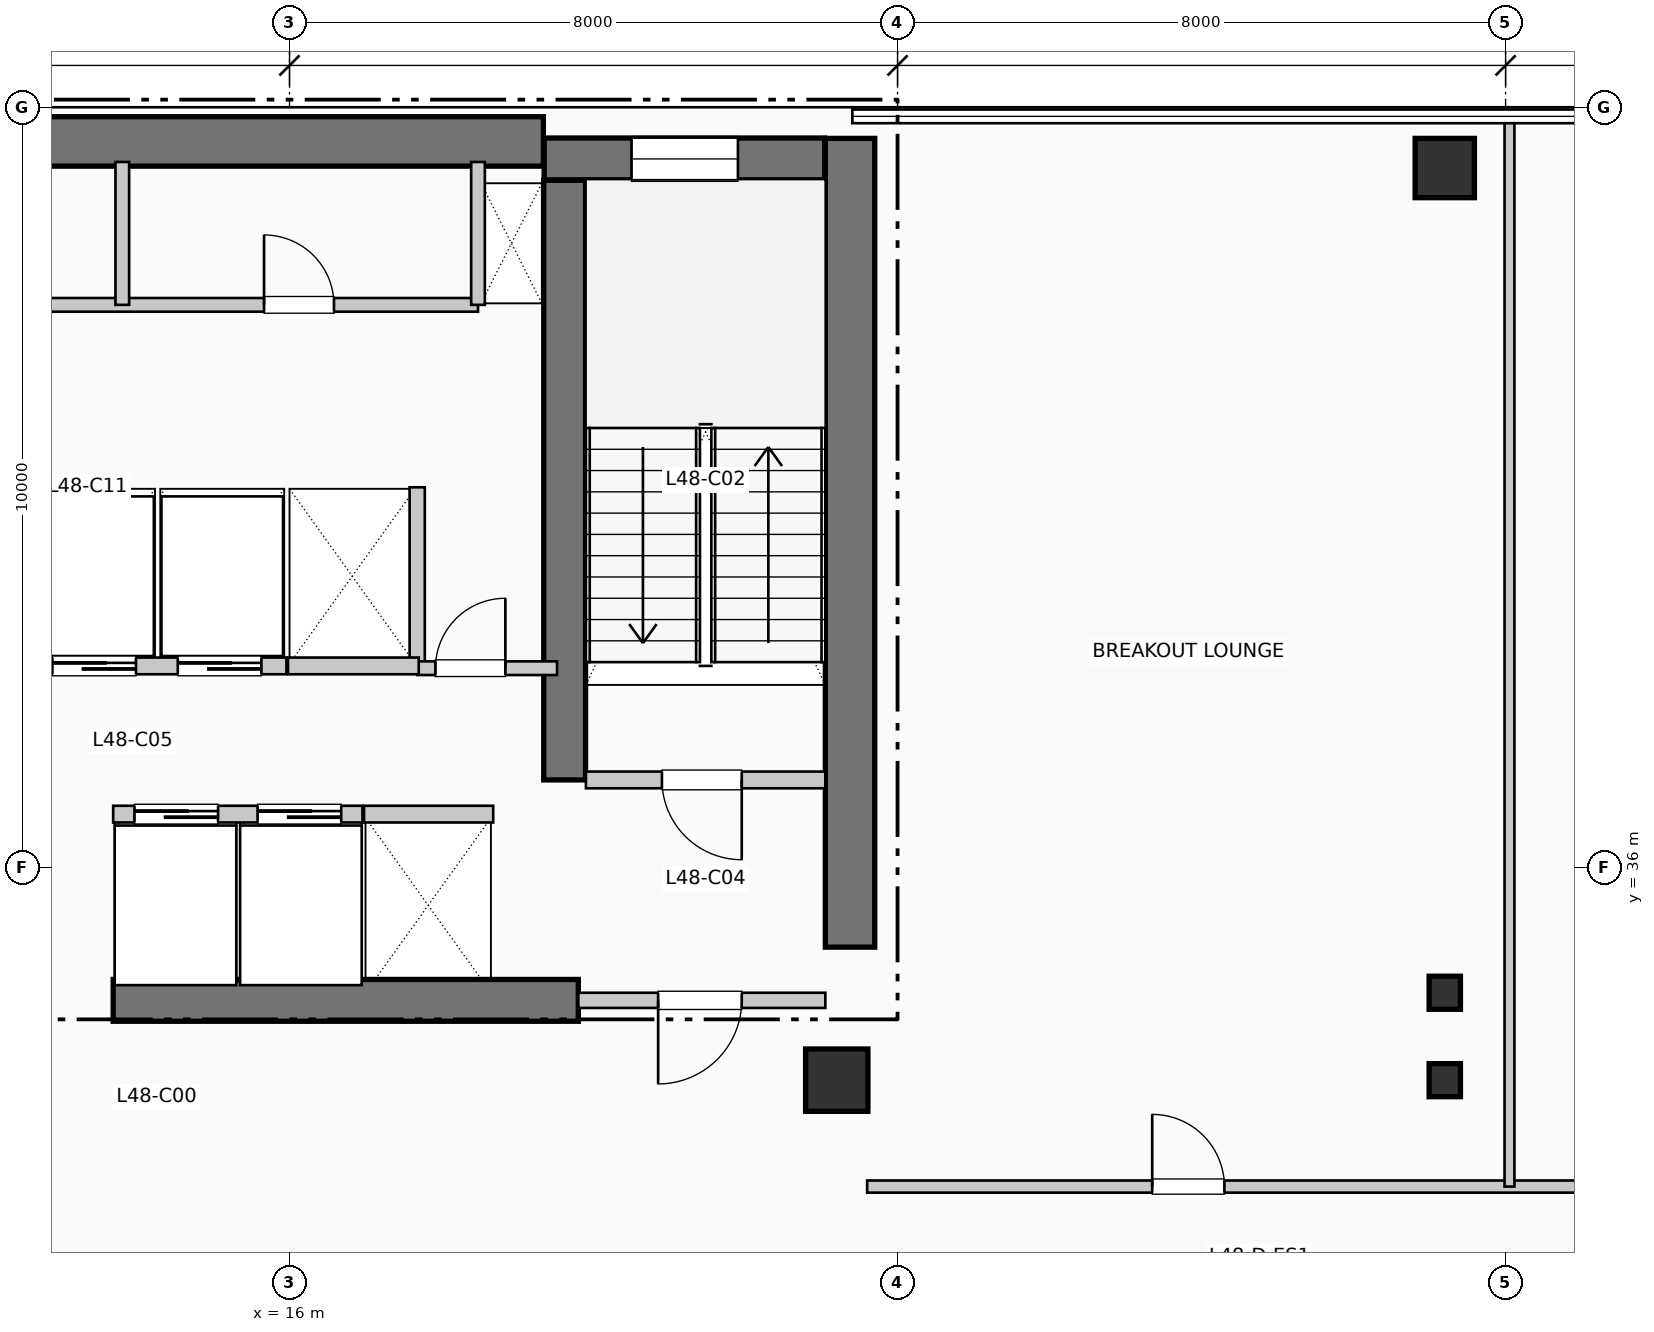
"""IFC4 building model, lengths in metres.
Left out: names, types, materials, properties, quantities, classifications, styles, units other than length and angle.
Written with IfcOpenShell. Run it as: python <this file> out.ifc"""

import sys

from ifc_helpers import new_model, si_unit, direction, frame, frame_2d, origin, origin_2d, place, context, subcontext, project, spatial, rectangle, i_section, extrude, element, fill, save


model = new_model("IFC4")
c1 = context("Model", 3, precision=1e-05, world=origin(), true_north=direction((0.0, 1.0)))
c2 = subcontext(c1, "Body", "Model", "MODEL_VIEW")
j1 = project(units=[si_unit("LENGTHUNIT", "METRE"), si_unit("PLANEANGLEUNIT", "RADIAN")], contexts=[c1])
p1 = place(None, origin())
s1 = spatial("IfcSite", under=j1, at=p1, CompositionType="ELEMENT")
p2 = place(p1, origin())
s2 = spatial("IfcBuilding", under=s1, at=p2, CompositionType="ELEMENT")
p3 = place(p2, frame((0.0, 0.0, 199.32)))
s3 = spatial("IfcBuildingStorey", under=s2, at=p3, CompositionType="ELEMENT", Elevation=199.32)
p4 = place(p3, frame((5.36, 45.55, 0.0), z_axis=(0.0, 0.0, 1.0), x_axis=(1.0, 0.0, 0.0)))
e1 = element("IfcWall", 1, at=p4, inside=s3, PredefinedType="SHEAR", context=c2, shape_type="SweptSolid", body=[
    extrude(rectangle(XDim=13.98, YDim=0.65, at=frame_2d((6.99, 0.0))), origin(), (0.0, 0.0, 1.0), 3.96),
])
p5 = place(p3, frame((23.375, 34.95, 0.0), z_axis=(0.0, 0.0, 1.0), x_axis=(0.0, 1.0, 0.0)))
e2 = element("IfcWall", 2, at=p5, inside=s3, PredefinedType="SHEAR", context=c2, shape_type="SweptSolid", body=[
    extrude(rectangle(XDim=10.64, YDim=0.65, at=frame_2d((5.32, 0.0))), origin(), (0.0, 0.0, 1.0), 3.96),
])
p6 = place(p3, frame((13.68, 34.25, 0.0), z_axis=(0.0, 0.0, 1.0), x_axis=(1.0, 0.0, 0.0)))
e3 = element("IfcWall", 3, at=p6, inside=s3, PredefinedType="SHEAR", context=c2, shape_type="SweptSolid", body=[
    extrude(rectangle(XDim=6.12, YDim=0.55, at=frame_2d((3.06, 0.0))), origin(), (0.0, 0.0, 1.0), 3.96),
])
p7 = place(p3, frame((19.62, 37.15, 0.0), z_axis=(0.0, 0.0, 1.0), x_axis=(0.0, 1.0, 0.0)))
e4 = element("IfcWall", 4, at=p7, inside=s3, PredefinedType="SHEAR", context=c2, shape_type="SweptSolid", body=[
    extrude(rectangle(XDim=7.89, YDim=0.55, at=frame_2d((3.945, 0.0))), origin(), (0.0, 0.0, 1.0), 3.96),
])
p8 = place(p3, frame((19.35, 45.32, 0.0), z_axis=(0.0, 0.0, 1.0), x_axis=(1.0, 0.0, 0.0)))
e5 = element("IfcWall", 5, at=p8, inside=s3, PredefinedType="SHEAR", context=c2, shape_type="SweptSolid", body=[
    extrude(rectangle(XDim=3.69, YDim=0.55, at=frame_2d((1.845, 0.0))), origin(), (0.0, 0.0, 1.0), 3.96),
])
p9 = place(p8, frame((1.15, 0.0, 1.05)))
e6 = element("IfcOpeningElement", 6, at=p9, cuts=e5, PredefinedType="OPENING", context=c2, shape_type="SweptSolid", body=[
    extrude(rectangle(XDim=1.4, YDim=1.8, at=frame_2d((0.7, 0.9))), frame((0.0, 0.285, 0.0), z_axis=(0.0, -1.0, 0.0), x_axis=(1.0, 0.0, 0.0)), (0.0, 0.0, 1.0), 0.57),
])
p10 = place(p3, frame((23.2, 33.2, 0.0), z_axis=(0.0, 0.0, 1.0), x_axis=(1.0, 0.0, 0.0)))
e7 = element("IfcColumn", 7, at=p10, inside=s3, PredefinedType="COLUMN", context=c2, shape_type="SweptSolid", body=[
    extrude(rectangle(XDim=0.82, YDim=0.82, at=origin_2d()), origin(), (0.0, 0.0, 1.0), 3.96),
])
for number, where, z_axis, x_axis in (
    (8, (31.2, 33.2, 0.0), (0.0, 0.0, 1.0), (1.0, 0.0, 0.0)),
    (9, (31.2, 34.35, 0.0), (0.0, 0.0, 1.0), (1.0, 0.0, 0.0)),
):
    element("IfcColumn", number, at=place(p3, frame(where, z_axis=z_axis, x_axis=x_axis)), inside=s3, PredefinedType="COLUMN", context=c2, shape_type="SweptSolid", body=[
        extrude(i_section(OverallWidth=0.412, OverallDepth=0.435, WebThickness=0.027, FlangeThickness=0.043, at=origin_2d()), origin(), (0.0, 0.0, 1.0), 3.96),
    ])
p11 = place(p3, frame((31.2, 45.2, 0.0), z_axis=(0.0, 0.0, 1.0), x_axis=(1.0, 0.0, 0.0)))
e10 = element("IfcColumn", 10, at=p11, inside=s3, PredefinedType="COLUMN", context=c2, shape_type="SweptSolid", body=[
    extrude(rectangle(XDim=0.78, YDim=0.78, at=origin_2d()), origin(), (0.0, 0.0, 1.0), 3.96),
])
p12 = place(p3, frame((19.9, 37.15, 0.0), z_axis=(0.0, 0.0, 1.0), x_axis=(1.0, 0.0, 0.0)))
e11 = element("IfcWall", 11, at=p12, inside=s3, PredefinedType="PARTITIONING", context=c2, shape_type="SweptSolid", body=[
    extrude(rectangle(XDim=3.15, YDim=0.22, at=frame_2d((1.575, 0.0))), origin(), (0.0, 0.0, 1.0), 3.71),
])
p13 = place(p12, frame((2.05, 0.0, 0.0), z_axis=(0.0, 0.0, 1.0), x_axis=(-1.0, 0.0, 0.0)))
e12 = element("IfcOpeningElement", 12, at=p13, cuts=e11, PredefinedType="OPENING", context=c2, shape_type="SweptSolid", body=[
    extrude(rectangle(XDim=1.05, YDim=2.15, at=frame_2d((0.525, 1.075))), frame((0.0, 0.12, 0.0), z_axis=(0.0, -1.0, 0.0), x_axis=(1.0, 0.0, 0.0)), (0.0, 0.0, 1.0), 0.24),
])
p14 = place(p3, frame((19.8, 34.25, 0.0), z_axis=(0.0, 0.0, 1.0), x_axis=(1.0, 0.0, 0.0)))
e13 = element("IfcWall", 13, at=p14, inside=s3, PredefinedType="PARTITIONING", context=c2, shape_type="SweptSolid", body=[
    extrude(rectangle(XDim=3.25, YDim=0.2, at=frame_2d((1.625, 0.0))), origin(), (0.0, 0.0, 1.0), 3.71),
])
p15 = place(p14, frame((2.15, 0.0, 0.0), z_axis=(0.0, 0.0, 1.0), x_axis=(-1.0, 0.0, 0.0)))
e14 = element("IfcOpeningElement", 14, at=p15, cuts=e13, PredefinedType="OPENING", context=c2, shape_type="SweptSolid", body=[
    extrude(rectangle(XDim=1.1, YDim=2.15, at=frame_2d((0.55, 1.075))), frame((0.0, 0.11, 0.0), z_axis=(0.0, -1.0, 0.0), x_axis=(1.0, 0.0, 0.0)), (0.0, 0.0, 1.0), 0.22),
])
p16 = place(p3, frame((17.68, 38.65, 0.0), z_axis=(0.0, 0.0, 1.0), x_axis=(0.0, 1.0, 0.0)))
e15 = element("IfcWall", 15, at=p16, inside=s3, PredefinedType="PARTITIONING", context=c2, shape_type="SweptSolid", body=[
    extrude(rectangle(XDim=2.35, YDim=0.2, at=frame_2d((1.175, 0.0))), origin(), (0.0, 0.0, 1.0), 3.71),
])
p17 = place(p3, frame((17.68, 38.62, 0.0), z_axis=(0.0, 0.0, 1.0), x_axis=(1.0, 0.0, 0.0)))
e16 = element("IfcWall", 16, at=p17, inside=s3, PredefinedType="PARTITIONING", context=c2, shape_type="SweptSolid", body=[
    extrude(rectangle(XDim=1.84, YDim=0.18, at=frame_2d((0.92, 0.0))), origin(), (0.0, 0.0, 1.0), 3.71),
])
p18 = place(p17, frame((0.24, 0.0, 0.0)))
e17 = element("IfcOpeningElement", 17, at=p18, cuts=e16, PredefinedType="OPENING", context=c2, shape_type="SweptSolid", body=[
    extrude(rectangle(XDim=0.92, YDim=2.1, at=frame_2d((0.46, 1.05))), frame((0.0, 0.1, 0.0), z_axis=(0.0, -1.0, 0.0), x_axis=(1.0, 0.0, 0.0)), (0.0, 0.0, 1.0), 0.2),
])
p19 = place(p3, frame((13.68, 36.7, 0.0), z_axis=(0.0, 0.0, 1.0), x_axis=(1.0, 0.0, 0.0)))
e18 = element("IfcWall", 18, at=p19, inside=s3, PredefinedType="PARTITIONING", context=c2, shape_type="SweptSolid", body=[
    extrude(rectangle(XDim=3.28, YDim=0.22, at=frame_2d((1.64, 0.0))), origin(), (0.0, 0.0, 1.0), 3.71),
])
p20 = place(p19, frame((0.28, 0.0, 0.0)))
e19 = element("IfcOpeningElement", 19, at=p20, cuts=e18, PredefinedType="OPENING", context=c2, shape_type="SweptSolid", body=[
    extrude(rectangle(XDim=1.1, YDim=2.2, at=frame_2d((0.55, 1.1))), frame((0.0, 0.12, 0.0), z_axis=(0.0, -1.0, 0.0), x_axis=(1.0, 0.0, 0.0)), (0.0, 0.0, 1.0), 0.24),
])
p21 = place(p19, frame((1.9, 0.0, 0.0)))
e20 = element("IfcOpeningElement", 20, at=p21, cuts=e18, PredefinedType="OPENING", context=c2, shape_type="SweptSolid", body=[
    extrude(rectangle(XDim=1.1, YDim=2.2, at=frame_2d((0.55, 1.1))), frame((0.0, 0.12, 0.0), z_axis=(0.0, -1.0, 0.0), x_axis=(1.0, 0.0, 0.0)), (0.0, 0.0, 1.0), 0.24),
])
p22 = place(p3, frame((12.58, 38.65, 0.0), z_axis=(0.0, 0.0, 1.0), x_axis=(1.0, 0.0, 0.0)))
e21 = element("IfcWall", 21, at=p22, inside=s3, PredefinedType="PARTITIONING", context=c2, shape_type="SweptSolid", body=[
    extrude(rectangle(XDim=3.38, YDim=0.22, at=frame_2d((1.69, 0.0))), origin(), (0.0, 0.0, 1.0), 3.71),
])
p23 = place(p22, frame((0.3, 0.0, 0.0)))
e22 = element("IfcOpeningElement", 22, at=p23, cuts=e21, PredefinedType="OPENING", context=c2, shape_type="SweptSolid", body=[
    extrude(rectangle(XDim=1.1, YDim=2.2, at=frame_2d((0.55, 1.1))), frame((0.0, 0.12, 0.0), z_axis=(0.0, -1.0, 0.0), x_axis=(1.0, 0.0, 0.0)), (0.0, 0.0, 1.0), 0.24),
])
p24 = place(p22, frame((1.95, 0.0, 0.0)))
e23 = element("IfcOpeningElement", 23, at=p24, cuts=e21, PredefinedType="OPENING", context=c2, shape_type="SweptSolid", body=[
    extrude(rectangle(XDim=1.1, YDim=2.2, at=frame_2d((0.55, 1.1))), frame((0.0, 0.12, 0.0), z_axis=(0.0, -1.0, 0.0), x_axis=(1.0, 0.0, 0.0)), (0.0, 0.0, 1.0), 0.24),
])
p25 = place(p3, frame((16.98, 36.7, 0.0), z_axis=(0.0, 0.0, 1.0), x_axis=(1.0, 0.0, 0.0)))
e24 = element("IfcWall", 24, at=p25, inside=s3, PredefinedType="PARTITIONING", context=c2, shape_type="SweptSolid", body=[
    extrude(rectangle(XDim=1.7, YDim=0.22, at=frame_2d((0.85, 0.0))), origin(), (0.0, 0.0, 1.0), 3.71),
])
p26 = place(p3, frame((15.98, 38.65, 0.0), z_axis=(0.0, 0.0, 1.0), x_axis=(1.0, 0.0, 0.0)))
e25 = element("IfcWall", 25, at=p26, inside=s3, PredefinedType="PARTITIONING", context=c2, shape_type="SweptSolid", body=[
    extrude(rectangle(XDim=1.72, YDim=0.22, at=frame_2d((0.86, 0.0))), origin(), (0.0, 0.0, 1.0), 3.71),
])
p27 = place(p3, frame((9.15, 43.4, 0.0), z_axis=(0.0, 0.0, 1.0), x_axis=(1.0, 0.0, 0.0)))
e26 = element("IfcWall", 26, at=p27, inside=s3, PredefinedType="PLUMBINGWALL", context=c2, shape_type="SweptSolid", body=[
    extrude(rectangle(XDim=9.33, YDim=0.18, at=frame_2d((4.665, 0.0))), origin(), (0.0, 0.0, 1.0), 3.71),
])
p28 = place(p27, frame((1.88, 0.0, 0.0)))
e27 = element("IfcOpeningElement", 27, at=p28, cuts=e26, PredefinedType="OPENING", context=c2, shape_type="SweptSolid", body=[
    extrude(rectangle(XDim=0.92, YDim=2.1, at=frame_2d((0.46, 1.05))), frame((0.0, 0.1, 0.0), z_axis=(0.0, -1.0, 0.0), x_axis=(1.0, 0.0, 0.0)), (0.0, 0.0, 1.0), 0.2),
])
p29 = place(p27, frame((6.515, 0.0, 0.0)))
e28 = element("IfcOpeningElement", 28, at=p29, cuts=e26, PredefinedType="OPENING", context=c2, shape_type="SweptSolid", body=[
    extrude(rectangle(XDim=0.92, YDim=2.1, at=frame_2d((0.46, 1.05))), frame((0.0, 0.1, 0.0), z_axis=(0.0, -1.0, 0.0), x_axis=(1.0, 0.0, 0.0)), (0.0, 0.0, 1.0), 0.2),
])
for number, where, z_axis, x_axis in (
    (29, (18.48, 43.4, 0.0), (0.0, 0.0, 1.0), (0.0, 1.0, 0.0)),
    (30, (13.8, 43.4, 0.0), (0.0, 0.0, 1.0), (0.0, 1.0, 0.0)),
):
    element("IfcWall", number, at=place(p3, frame(where, z_axis=z_axis, x_axis=x_axis)), inside=s3, PredefinedType="PLUMBINGWALL", context=c2, shape_type="SweptSolid", body=[
        extrude(rectangle(XDim=1.88, YDim=0.18, at=frame_2d((0.94, 0.0))), origin(), (0.0, 0.0, 1.0), 3.71),
    ])
p30 = place(p3, frame((23.6, 31.8, 0.0), z_axis=(0.0, 0.0, 1.0), x_axis=(1.0, 0.0, 0.0)))
e31 = element("IfcWall", 31, at=p30, inside=s3, PredefinedType="PARTITIONING", context=c2, shape_type="SweptSolid", body=[
    extrude(rectangle(XDim=26.41, YDim=0.16, at=frame_2d((13.205, 0.0))), origin(), (0.0, 0.0, 1.0), 3.71),
])
p31 = place(p30, frame((3.75, 0.0, 0.0)))
e32 = element("IfcOpeningElement", 32, at=p31, cuts=e31, PredefinedType="OPENING", context=c2, shape_type="SweptSolid", body=[
    extrude(rectangle(XDim=0.95, YDim=2.15, at=frame_2d((0.475, 1.075))), frame((0.0, 0.09, 0.0), z_axis=(0.0, -1.0, 0.0), x_axis=(1.0, 0.0, 0.0)), (0.0, 0.0, 1.0), 0.18),
])
p32 = place(p30, frame((12.334, 0.0, 0.0)))
e33 = element("IfcOpeningElement", 33, at=p32, cuts=e31, PredefinedType="OPENING", context=c2, shape_type="SweptSolid", body=[
    extrude(rectangle(XDim=0.95, YDim=2.15, at=frame_2d((0.475, 1.075))), frame((0.0, 0.09, 0.0), z_axis=(0.0, -1.0, 0.0), x_axis=(1.0, 0.0, 0.0)), (0.0, 0.0, 1.0), 0.18),
])
p33 = place(p30, frame((21.313, 0.0, 0.0)))
e34 = element("IfcOpeningElement", 34, at=p33, cuts=e31, PredefinedType="OPENING", context=c2, shape_type="SweptSolid", body=[
    extrude(rectangle(XDim=0.95, YDim=2.15, at=frame_2d((0.475, 1.075))), frame((0.0, 0.09, 0.0), z_axis=(0.0, -1.0, 0.0), x_axis=(1.0, 0.0, 0.0)), (0.0, 0.0, 1.0), 0.18),
])
p34 = place(p3, frame((32.051, 31.8, 0.0), z_axis=(0.0, 0.0, 1.0), x_axis=(0.0, 1.0, 0.0)))
e35 = element("IfcWall", 35, at=p34, inside=s3, PredefinedType="PARTITIONING", context=c2, shape_type="SweptSolid", body=[
    extrude(rectangle(XDim=14.01, YDim=0.13, at=frame_2d((7.005, 0.0))), origin(), (0.0, 0.0, 1.0), 3.71),
])
p35 = place(p9, origin())
e36 = element("IfcWindow", 36, at=p35, inside=s3, PartitioningType="SINGLE_PANEL", PredefinedType="WINDOW", context=c2, shape_type="SweptSolid", body=[
    extrude(rectangle(XDim=1.4, YDim=1.8, at=frame_2d((0.7, 0.9))), frame((0.0, 0.03, 0.0), z_axis=(0.0, -1.0, 0.0), x_axis=(1.0, 0.0, 0.0)), (0.0, 0.0, 1.0), 0.06),
])
fill(e6, e36)
p36 = place(p13, origin())
e37 = element("IfcDoor", 37, at=p36, inside=s3, OperationType="SINGLE_SWING_RIGHT", PredefinedType="DOOR", context=c2, shape_type="SweptSolid", body=[
    extrude(rectangle(XDim=1.05, YDim=2.15, at=frame_2d((0.525, 1.075))), frame((0.0, 0.025, 0.0), z_axis=(0.0, -1.0, 0.0), x_axis=(1.0, 0.0, 0.0)), (0.0, 0.0, 1.0), 0.05),
])
fill(e12, e37)
p37 = place(p15, origin())
e38 = element("IfcDoor", 38, at=p37, inside=s3, OperationType="SINGLE_SWING_LEFT", PredefinedType="DOOR", context=c2, shape_type="SweptSolid", body=[
    extrude(rectangle(XDim=1.1, YDim=2.15, at=frame_2d((0.55, 1.075))), frame((0.0, 0.025, 0.0), z_axis=(0.0, -1.0, 0.0), x_axis=(1.0, 0.0, 0.0)), (0.0, 0.0, 1.0), 0.05),
])
fill(e14, e38)
p38 = place(p18, origin())
e39 = element("IfcDoor", 39, at=p38, inside=s3, OperationType="SINGLE_SWING_RIGHT", PredefinedType="DOOR", context=c2, shape_type="SweptSolid", body=[
    extrude(rectangle(XDim=0.92, YDim=2.1, at=frame_2d((0.46, 1.05))), frame((0.0, 0.025, 0.0), z_axis=(0.0, -1.0, 0.0), x_axis=(1.0, 0.0, 0.0)), (0.0, 0.0, 1.0), 0.05),
])
fill(e17, e39)
p39 = place(p20, origin())
e40 = element("IfcDoor", 40, at=p39, inside=s3, OperationType="SLIDING_TO_RIGHT", PredefinedType="DOOR", context=c2, shape_type="SweptSolid", body=[
    extrude(rectangle(XDim=1.1, YDim=2.2, at=frame_2d((0.55, 1.1))), frame((0.0, 0.025, 0.0), z_axis=(0.0, -1.0, 0.0), x_axis=(1.0, 0.0, 0.0)), (0.0, 0.0, 1.0), 0.05),
])
fill(e19, e40)
p40 = place(p21, origin())
e41 = element("IfcDoor", 41, at=p40, inside=s3, OperationType="SLIDING_TO_RIGHT", PredefinedType="DOOR", context=c2, shape_type="SweptSolid", body=[
    extrude(rectangle(XDim=1.1, YDim=2.2, at=frame_2d((0.55, 1.1))), frame((0.0, 0.025, 0.0), z_axis=(0.0, -1.0, 0.0), x_axis=(1.0, 0.0, 0.0)), (0.0, 0.0, 1.0), 0.05),
])
fill(e20, e41)
p41 = place(p23, origin())
e42 = element("IfcDoor", 42, at=p41, inside=s3, OperationType="SLIDING_TO_RIGHT", PredefinedType="DOOR", context=c2, shape_type="SweptSolid", body=[
    extrude(rectangle(XDim=1.1, YDim=2.2, at=frame_2d((0.55, 1.1))), frame((0.0, 0.025, 0.0), z_axis=(0.0, -1.0, 0.0), x_axis=(1.0, 0.0, 0.0)), (0.0, 0.0, 1.0), 0.05),
])
fill(e22, e42)
p42 = place(p24, origin())
e43 = element("IfcDoor", 43, at=p42, inside=s3, OperationType="SLIDING_TO_RIGHT", PredefinedType="DOOR", context=c2, shape_type="SweptSolid", body=[
    extrude(rectangle(XDim=1.1, YDim=2.2, at=frame_2d((0.55, 1.1))), frame((0.0, 0.025, 0.0), z_axis=(0.0, -1.0, 0.0), x_axis=(1.0, 0.0, 0.0)), (0.0, 0.0, 1.0), 0.05),
])
fill(e23, e43)
p43 = place(p29, origin())
e44 = element("IfcDoor", 44, at=p43, inside=s3, OperationType="SINGLE_SWING_LEFT", PredefinedType="DOOR", context=c2, shape_type="SweptSolid", body=[
    extrude(rectangle(XDim=0.92, YDim=2.1, at=frame_2d((0.46, 1.05))), frame((0.0, 0.025, 0.0), z_axis=(0.0, -1.0, 0.0), x_axis=(1.0, 0.0, 0.0)), (0.0, 0.0, 1.0), 0.05),
])
fill(e28, e44)
p44 = place(p31, origin())
e45 = element("IfcDoor", 45, at=p44, inside=s3, OperationType="SINGLE_SWING_LEFT", PredefinedType="DOOR", context=c2, shape_type="SweptSolid", body=[
    extrude(rectangle(XDim=0.95, YDim=2.15, at=frame_2d((0.475, 1.075))), frame((0.0, 0.025, 0.0), z_axis=(0.0, -1.0, 0.0), x_axis=(1.0, 0.0, 0.0)), (0.0, 0.0, 1.0), 0.05),
])
fill(e32, e45)
save(model, sys.argv[1])
